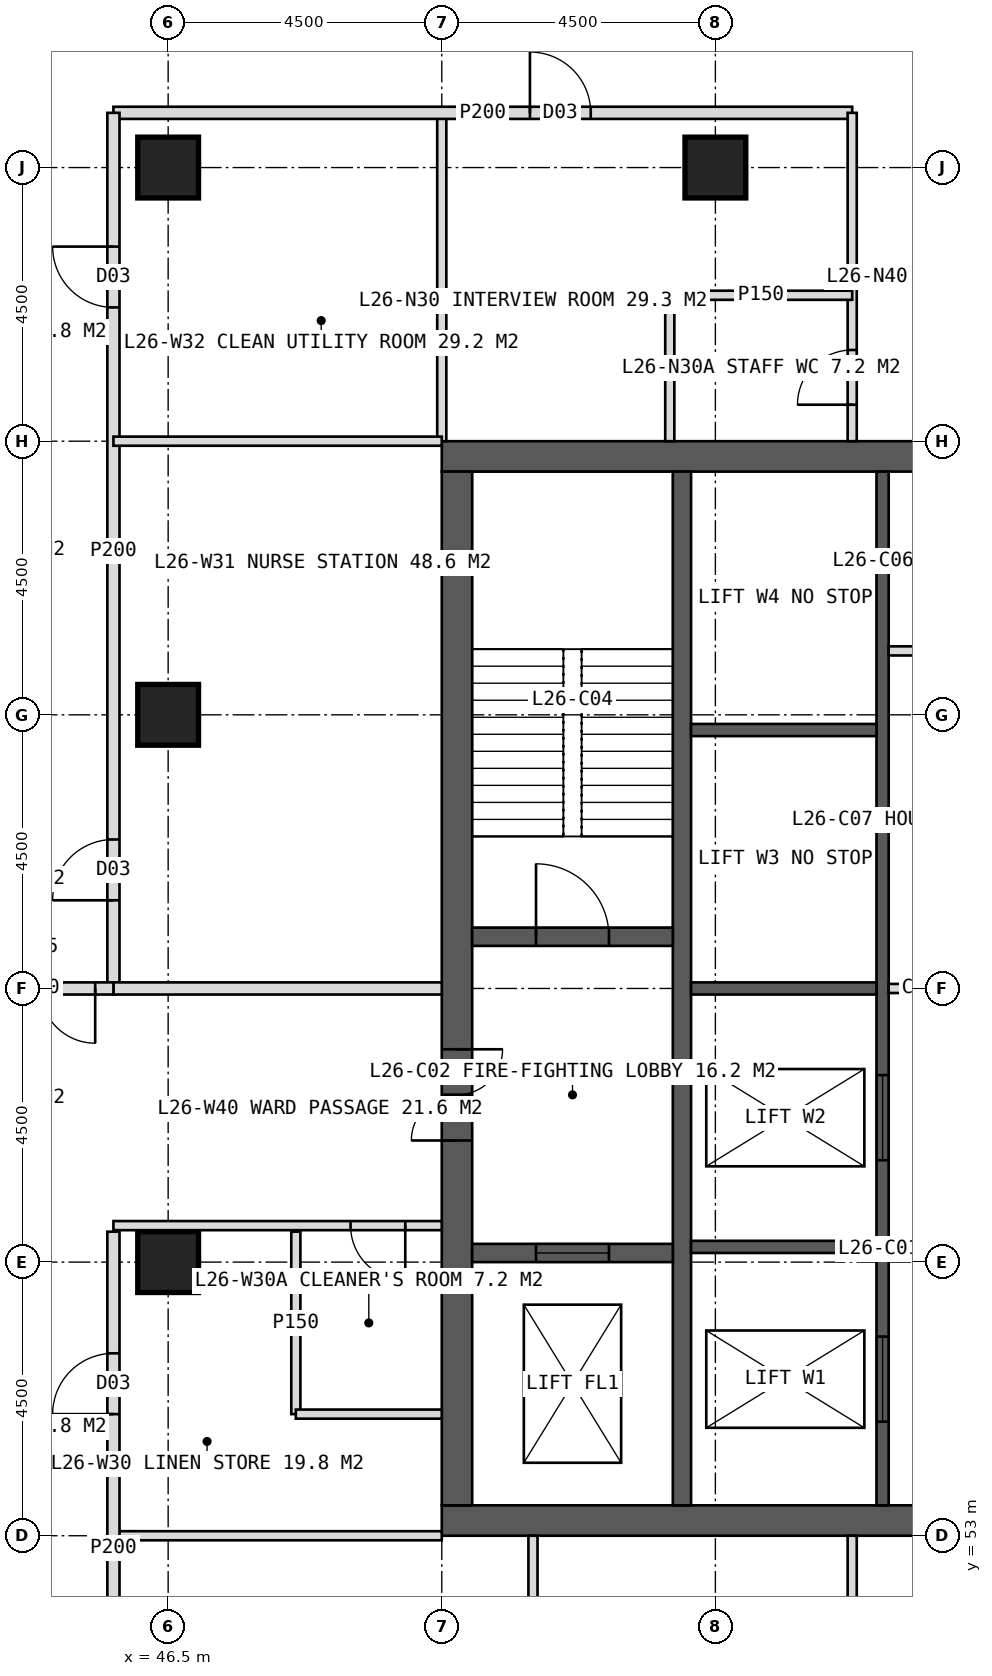
"""IFC4 building model, lengths in metres.
Left out: names, types, materials, properties, quantities, classifications, styles, units other than length and angle.
Written with IfcOpenShell. Run it as: python <this file> out.ifc"""

import sys

from ifc_helpers import new_model, si_unit, direction, frame, frame_2d, origin, origin_2d, place, context, subcontext, project, spatial, rectangle, hollow_rectangle, extrude, element, fill, save


model = new_model("IFC4")
c1 = context("Model", 3, precision=1e-05, world=origin(), true_north=direction((0.0, 1.0)))
c2 = subcontext(c1, "Body", "Model", "MODEL_VIEW")
j1 = project(units=[si_unit("LENGTHUNIT", "METRE"), si_unit("PLANEANGLEUNIT", "RADIAN")], contexts=[c1])
p1 = place(None, origin())
s1 = spatial("IfcSite", under=j1, at=p1, CompositionType="ELEMENT")
p2 = place(p1, origin())
s2 = spatial("IfcBuilding", under=s1, at=p2, CompositionType="ELEMENT")
p3 = place(p2, frame((0.0, 0.0, 112.0)))
s3 = spatial("IfcBuildingStorey", under=s2, at=p3, CompositionType="ELEMENT", Elevation=112.0)
p4 = place(p3, frame((51.0, 70.75, 0.0), z_axis=(0.0, 0.0, 1.0), x_axis=(1.0, 0.0, 0.0)))
e1 = element("IfcWall", 1, at=p4, inside=s3, PredefinedType="SHEAR", context=c2, shape_type="SweptSolid", body=[
    extrude(rectangle(XDim=18.0, YDim=0.5, at=frame_2d((9.0, 0.0))), origin(), (0.0, 0.0, 1.0), 4.0),
])
p5 = place(p4, frame((8.1, 0.0, 0.0)))
e2 = element("IfcOpeningElement", 2, at=p5, cuts=e1, PredefinedType="OPENING", context=c2, shape_type="SweptSolid", body=[
    extrude(rectangle(XDim=1.8, YDim=2.2, at=frame_2d((0.9, 1.1))), frame((0.0, 0.26, 0.0), z_axis=(0.0, -1.0, 0.0), x_axis=(1.0, 0.0, 0.0)), (0.0, 0.0, 1.0), 0.52),
])
p6 = place(p3, frame((51.0, 53.25, 0.0), z_axis=(0.0, 0.0, 1.0), x_axis=(1.0, 0.0, 0.0)))
e3 = element("IfcWall", 3, at=p6, inside=s3, PredefinedType="SHEAR", context=c2, shape_type="SweptSolid", body=[
    extrude(rectangle(XDim=18.0, YDim=0.5, at=frame_2d((9.0, 0.0))), origin(), (0.0, 0.0, 1.0), 4.0),
])
p7 = place(p6, frame((8.1, 0.0, 0.0)))
e4 = element("IfcOpeningElement", 4, at=p7, cuts=e3, PredefinedType="OPENING", context=c2, shape_type="SweptSolid", body=[
    extrude(rectangle(XDim=1.8, YDim=2.2, at=frame_2d((0.9, 1.1))), frame((0.0, 0.26, 0.0), z_axis=(0.0, -1.0, 0.0), x_axis=(1.0, 0.0, 0.0)), (0.0, 0.0, 1.0), 0.52),
])
p8 = place(p3, frame((51.25, 53.5, 0.0), z_axis=(0.0, 0.0, 1.0), x_axis=(0.0, 1.0, 0.0)))
e5 = element("IfcWall", 5, at=p8, inside=s3, PredefinedType="SHEAR", context=c2, shape_type="SweptSolid", body=[
    extrude(rectangle(XDim=17.0, YDim=0.5, at=frame_2d((8.5, 0.0))), origin(), (0.0, 0.0, 1.0), 4.0),
])
p9 = place(p8, frame((6.0, 0.0, 0.0)))
e6 = element("IfcOpeningElement", 6, at=p9, cuts=e5, PredefinedType="OPENING", context=c2, shape_type="SweptSolid", body=[
    extrude(rectangle(XDim=1.5, YDim=2.2, at=frame_2d((0.75, 1.1))), frame((0.0, 0.26, 0.0), z_axis=(0.0, -1.0, 0.0), x_axis=(1.0, 0.0, 0.0)), (0.0, 0.0, 1.0), 0.52),
])
p10 = place(p3, frame((54.95, 53.5, 0.0), z_axis=(0.0, 0.0, 1.0), x_axis=(0.0, 1.0, 0.0)))
e7 = element("IfcWall", 7, at=p10, inside=s3, PredefinedType="SHEAR", context=c2, shape_type="SweptSolid", body=[
    extrude(rectangle(XDim=17.0, YDim=0.3, at=frame_2d((8.5, 0.0))), origin(), (0.0, 0.0, 1.0), 4.0),
])
p11 = place(p3, frame((58.25, 53.5, 0.0), z_axis=(0.0, 0.0, 1.0), x_axis=(0.0, 1.0, 0.0)))
e8 = element("IfcWall", 8, at=p11, inside=s3, PredefinedType="SHEAR", context=c2, shape_type="SweptSolid", body=[
    extrude(rectangle(XDim=17.0, YDim=0.2, at=frame_2d((8.5, 0.0))), origin(), (0.0, 0.0, 1.0), 4.0),
])
p12 = place(p11, frame((1.375, 0.0, 0.0)))
e9 = element("IfcOpeningElement", 9, at=p12, cuts=e8, PredefinedType="OPENING", context=c2, shape_type="SweptSolid", body=[
    extrude(rectangle(XDim=1.4, YDim=2.2, at=frame_2d((0.7, 1.1))), frame((0.0, 0.11, 0.0), z_axis=(0.0, -1.0, 0.0), x_axis=(1.0, 0.0, 0.0)), (0.0, 0.0, 1.0), 0.22),
])
p13 = place(p11, frame((5.675, 0.0, 0.0)))
e10 = element("IfcOpeningElement", 10, at=p13, cuts=e8, PredefinedType="OPENING", context=c2, shape_type="SweptSolid", body=[
    extrude(rectangle(XDim=1.4, YDim=2.2, at=frame_2d((0.7, 1.1))), frame((0.0, 0.11, 0.0), z_axis=(0.0, -1.0, 0.0), x_axis=(1.0, 0.0, 0.0)), (0.0, 0.0, 1.0), 0.22),
])
for number, where, z_axis, x_axis in (
    (11, (55.1, 57.75, 0.0), (0.0, 0.0, 1.0), (1.0, 0.0, 0.0)),
    (12, (55.1, 62.0, 0.0), (0.0, 0.0, 1.0), (1.0, 0.0, 0.0)),
    (13, (55.1, 66.25, 0.0), (0.0, 0.0, 1.0), (1.0, 0.0, 0.0)),
):
    element("IfcWall", number, at=place(p3, frame(where, z_axis=z_axis, x_axis=x_axis)), inside=s3, PredefinedType="SHEAR", context=c2, shape_type="SweptSolid", body=[
        extrude(rectangle(XDim=3.05, YDim=0.2, at=frame_2d((1.525, 0.0))), origin(), (0.0, 0.0, 1.0), 4.0),
    ])
p14 = place(p3, frame((51.5, 62.85, 0.0), z_axis=(0.0, 0.0, 1.0), x_axis=(1.0, 0.0, 0.0)))
e14 = element("IfcWall", 14, at=p14, inside=s3, PredefinedType="SHEAR", context=c2, shape_type="SweptSolid", body=[
    extrude(rectangle(XDim=3.3, YDim=0.3, at=frame_2d((1.65, 0.0))), origin(), (0.0, 0.0, 1.0), 4.0),
])
p15 = place(p14, frame((1.05, 0.0, 0.0)))
e15 = element("IfcOpeningElement", 15, at=p15, cuts=e14, PredefinedType="OPENING", context=c2, shape_type="SweptSolid", body=[
    extrude(rectangle(XDim=1.2, YDim=2.1, at=frame_2d((0.6, 1.05))), frame((0.0, 0.16, 0.0), z_axis=(0.0, -1.0, 0.0), x_axis=(1.0, 0.0, 0.0)), (0.0, 0.0, 1.0), 0.32),
])
p16 = place(p3, frame((51.5, 57.65, 0.0), z_axis=(0.0, 0.0, 1.0), x_axis=(1.0, 0.0, 0.0)))
e16 = element("IfcWall", 16, at=p16, inside=s3, PredefinedType="SHEAR", context=c2, shape_type="SweptSolid", body=[
    extrude(rectangle(XDim=3.3, YDim=0.3, at=frame_2d((1.65, 0.0))), origin(), (0.0, 0.0, 1.0), 4.0),
])
p17 = place(p16, frame((1.05, 0.0, 0.0)))
e17 = element("IfcOpeningElement", 17, at=p17, cuts=e16, PredefinedType="OPENING", context=c2, shape_type="SweptSolid", body=[
    extrude(rectangle(XDim=1.2, YDim=2.2, at=frame_2d((0.6, 1.1))), frame((0.0, 0.16, 0.0), z_axis=(0.0, -1.0, 0.0), x_axis=(1.0, 0.0, 0.0)), (0.0, 0.0, 1.0), 0.32),
])
for number, where, z_axis, x_axis in (
    (18, (46.5, 75.5, 0.0), (0.0, 0.0, 1.0), (1.0, 0.0, 0.0)),
    (19, (55.5, 75.5, 0.0), (0.0, 0.0, 1.0), (1.0, 0.0, 0.0)),
    (20, (46.5, 57.5, 0.0), (0.0, 0.0, 1.0), (1.0, 0.0, 0.0)),
    (21, (46.5, 66.5, 0.0), (0.0, 0.0, 1.0), (1.0, 0.0, 0.0)),
):
    element("IfcColumn", number, at=place(p3, frame(where, z_axis=z_axis, x_axis=x_axis)), inside=s3, PredefinedType="COLUMN", context=c2, shape_type="SweptSolid", body=[
        extrude(hollow_rectangle(XDim=1.0, YDim=1.0, WallThickness=0.1, at=origin_2d()), origin(), (0.0, 0.0, 1.0), 4.0),
    ])
p18 = place(p3, frame((51.0, 71.0, 0.0), z_axis=(0.0, 0.0, 1.0), x_axis=(0.0, 1.0, 0.0)))
e22 = element("IfcWall", 22, at=p18, inside=s3, PredefinedType="PARTITIONING", context=c2, shape_type="SweptSolid", body=[
    extrude(rectangle(XDim=5.4, YDim=0.15, at=frame_2d((2.7, 0.0))), origin(), (0.0, 0.0, 1.0), 3.75),
])
p19 = place(p3, frame((45.6, 76.4, 0.0), z_axis=(0.0, 0.0, 1.0), x_axis=(1.0, 0.0, 0.0)))
e23 = element("IfcWall", 23, at=p19, inside=s3, PredefinedType="PARTITIONING", context=c2, shape_type="SweptSolid", body=[
    extrude(rectangle(XDim=12.15, YDim=0.2, at=frame_2d((6.075, 0.0))), origin(), (0.0, 0.0, 1.0), 3.75),
])
p20 = place(p19, frame((6.85, 0.0, 0.0)))
e24 = element("IfcOpeningElement", 24, at=p20, cuts=e23, PredefinedType="OPENING", context=c2, shape_type="SweptSolid", body=[
    extrude(rectangle(XDim=1.0, YDim=2.1, at=frame_2d((0.5, 1.05))), frame((0.0, 0.11, 0.0), z_axis=(0.0, -1.0, 0.0), x_axis=(1.0, 0.0, 0.0)), (0.0, 0.0, 1.0), 0.22),
])
p21 = place(p3, frame((57.75, 71.0, 0.0), z_axis=(0.0, 0.0, 1.0), x_axis=(0.0, 1.0, 0.0)))
e25 = element("IfcWall", 25, at=p21, inside=s3, PredefinedType="PARTITIONING", context=c2, shape_type="SweptSolid", body=[
    extrude(rectangle(XDim=5.4, YDim=0.15, at=frame_2d((2.7, 0.0))), origin(), (0.0, 0.0, 1.0), 3.75),
])
p22 = place(p21, frame((0.6, 0.0, 0.0)))
e26 = element("IfcOpeningElement", 26, at=p22, cuts=e25, PredefinedType="OPENING", context=c2, shape_type="SweptSolid", body=[
    extrude(rectangle(XDim=0.9, YDim=2.1, at=frame_2d((0.45, 1.05))), frame((0.0, 0.085, 0.0), z_axis=(0.0, -1.0, 0.0), x_axis=(1.0, 0.0, 0.0)), (0.0, 0.0, 1.0), 0.17),
])
p23 = place(p3, frame((54.75, 73.4, 0.0), z_axis=(0.0, 0.0, 1.0), x_axis=(1.0, 0.0, 0.0)))
e27 = element("IfcWall", 27, at=p23, inside=s3, PredefinedType="PARTITIONING", context=c2, shape_type="SweptSolid", body=[
    extrude(rectangle(XDim=3.0, YDim=0.15, at=frame_2d((1.5, 0.0))), origin(), (0.0, 0.0, 1.0), 3.75),
])
p24 = place(p3, frame((54.75, 71.0, 0.0), z_axis=(0.0, 0.0, 1.0), x_axis=(0.0, 1.0, 0.0)))
e28 = element("IfcWall", 28, at=p24, inside=s3, PredefinedType="PARTITIONING", context=c2, shape_type="SweptSolid", body=[
    extrude(rectangle(XDim=2.4, YDim=0.15, at=frame_2d((1.2, 0.0))), origin(), (0.0, 0.0, 1.0), 3.75),
])
p25 = place(p3, frame((51.0, 53.0, 0.0), z_axis=(0.0, 0.0, 1.0), x_axis=(-1.0, 0.0, 0.0)))
e29 = element("IfcWall", 29, at=p25, inside=s3, PredefinedType="PARTITIONING", context=c2, shape_type="SweptSolid", body=[
    extrude(rectangle(XDim=5.4, YDim=0.15, at=frame_2d((2.7, 0.0))), origin(), (0.0, 0.0, 1.0), 3.75),
])
p26 = place(p3, frame((45.6, 47.6, 0.0), z_axis=(0.0, 0.0, 1.0), x_axis=(0.0, 1.0, 0.0)))
e30 = element("IfcWall", 30, at=p26, inside=s3, PredefinedType="PARTITIONING", context=c2, shape_type="SweptSolid", body=[
    extrude(rectangle(XDim=10.4, YDim=0.2, at=frame_2d((5.2, 0.0))), origin(), (0.0, 0.0, 1.0), 3.75),
])
p27 = place(p26, frame((7.4, 0.0, 0.0)))
e31 = element("IfcOpeningElement", 31, at=p27, cuts=e30, PredefinedType="OPENING", context=c2, shape_type="SweptSolid", body=[
    extrude(rectangle(XDim=1.0, YDim=2.1, at=frame_2d((0.5, 1.05))), frame((0.0, 0.11, 0.0), z_axis=(0.0, -1.0, 0.0), x_axis=(1.0, 0.0, 0.0)), (0.0, 0.0, 1.0), 0.22),
])
p28 = place(p3, frame((45.6, 62.0, 0.0), z_axis=(0.0, 0.0, 1.0), x_axis=(0.0, 1.0, 0.0)))
e32 = element("IfcWall", 32, at=p28, inside=s3, PredefinedType="PARTITIONING", context=c2, shape_type="SweptSolid", body=[
    extrude(rectangle(XDim=14.4, YDim=0.2, at=frame_2d((7.2, 0.0))), origin(), (0.0, 0.0, 1.0), 3.75),
])
p29 = place(p28, frame((1.45, 0.0, 0.0)))
e33 = element("IfcOpeningElement", 33, at=p29, cuts=e32, PredefinedType="OPENING", context=c2, shape_type="SweptSolid", body=[
    extrude(rectangle(XDim=1.0, YDim=2.1, at=frame_2d((0.5, 1.05))), frame((0.0, 0.11, 0.0), z_axis=(0.0, -1.0, 0.0), x_axis=(1.0, 0.0, 0.0)), (0.0, 0.0, 1.0), 0.22),
])
p30 = place(p28, frame((11.2, 0.0, 0.0)))
e34 = element("IfcOpeningElement", 34, at=p30, cuts=e32, PredefinedType="OPENING", context=c2, shape_type="SweptSolid", body=[
    extrude(rectangle(XDim=1.0, YDim=2.1, at=frame_2d((0.5, 1.05))), frame((0.0, 0.11, 0.0), z_axis=(0.0, -1.0, 0.0), x_axis=(1.0, 0.0, 0.0)), (0.0, 0.0, 1.0), 0.22),
])
p31 = place(p3, frame((51.0, 58.1, 0.0), z_axis=(0.0, 0.0, 1.0), x_axis=(-1.0, 0.0, 0.0)))
e35 = element("IfcWall", 35, at=p31, inside=s3, PredefinedType="PARTITIONING", context=c2, shape_type="SweptSolid", body=[
    extrude(rectangle(XDim=5.4, YDim=0.15, at=frame_2d((2.7, 0.0))), origin(), (0.0, 0.0, 1.0), 3.75),
])
p32 = place(p31, frame((0.6, 0.0, 0.0)))
e36 = element("IfcOpeningElement", 36, at=p32, cuts=e35, PredefinedType="OPENING", context=c2, shape_type="SweptSolid", body=[
    extrude(rectangle(XDim=0.9, YDim=2.1, at=frame_2d((0.45, 1.05))), frame((0.0, 0.085, 0.0), z_axis=(0.0, -1.0, 0.0), x_axis=(1.0, 0.0, 0.0)), (0.0, 0.0, 1.0), 0.17),
])
p33 = place(p3, frame((51.0, 62.0, 0.0), z_axis=(0.0, 0.0, 1.0), x_axis=(-1.0, 0.0, 0.0)))
e37 = element("IfcWall", 37, at=p33, inside=s3, PredefinedType="SOLIDWALL", context=c2, shape_type="SweptSolid", body=[
    extrude(rectangle(XDim=5.4, YDim=0.2, at=frame_2d((2.7, 0.0))), origin(), (0.0, 0.0, 1.0), 2.95),
])
p34 = place(p3, frame((51.0, 71.0, 0.0), z_axis=(0.0, 0.0, 1.0), x_axis=(-1.0, 0.0, 0.0)))
e38 = element("IfcWall", 38, at=p34, inside=s3, PredefinedType="PARTITIONING", context=c2, shape_type="SweptSolid", body=[
    extrude(rectangle(XDim=5.4, YDim=0.15, at=frame_2d((2.7, 0.0))), origin(), (0.0, 0.0, 1.0), 3.75),
])
p35 = place(p3, frame((48.6, 55.0, 0.0), z_axis=(0.0, 0.0, 1.0), x_axis=(0.0, 1.0, 0.0)))
e39 = element("IfcWall", 39, at=p35, inside=s3, PredefinedType="PARTITIONING", context=c2, shape_type="SweptSolid", body=[
    extrude(rectangle(XDim=3.0, YDim=0.15, at=frame_2d((1.5, 0.0))), origin(), (0.0, 0.0, 1.0), 3.75),
])
p36 = place(p3, frame((51.0, 55.0, 0.0), z_axis=(0.0, 0.0, 1.0), x_axis=(-1.0, 0.0, 0.0)))
e40 = element("IfcWall", 40, at=p36, inside=s3, PredefinedType="PARTITIONING", context=c2, shape_type="SweptSolid", body=[
    extrude(rectangle(XDim=2.4, YDim=0.15, at=frame_2d((1.2, 0.0))), origin(), (0.0, 0.0, 1.0), 3.75),
])
for number, where, z_axis, x_axis in (
    (41, (57.75, 53.0, 0.0), (0.0, 0.0, 1.0), (0.0, -1.0, 0.0)),
    (42, (52.5, 53.0, 0.0), (0.0, 0.0, 1.0), (0.0, -1.0, 0.0)),
):
    element("IfcWall", number, at=place(p3, frame(where, z_axis=z_axis, x_axis=x_axis)), inside=s3, PredefinedType="PARTITIONING", context=c2, shape_type="SweptSolid", body=[
        extrude(rectangle(XDim=5.4, YDim=0.15, at=frame_2d((2.7, 0.0))), origin(), (0.0, 0.0, 1.0), 3.75),
    ])
p37 = place(p3, frame((45.6, 62.0, 0.0), z_axis=(0.0, 0.0, 1.0), x_axis=(-1.0, 0.0, 0.0)))
e43 = element("IfcWall", 43, at=p37, inside=s3, PredefinedType="SOLIDWALL", context=c2, shape_type="SweptSolid", body=[
    extrude(rectangle(XDim=2.7, YDim=0.2, at=frame_2d((1.35, 0.0))), origin(), (0.0, 0.0, 1.0), 2.95),
])
p38 = place(p37, frame((0.3, 0.0, 0.0)))
e44 = element("IfcOpeningElement", 44, at=p38, cuts=e43, PredefinedType="OPENING", context=c2, shape_type="SweptSolid", body=[
    extrude(rectangle(XDim=1.8, YDim=2.2, at=frame_2d((0.9, 1.1))), frame((0.0, 0.11, 0.0), z_axis=(0.0, -1.0, 0.0), x_axis=(1.0, 0.0, 0.0)), (0.0, 0.0, 1.0), 0.22),
])
p39 = place(p3, frame((58.35, 62.0, 0.0), z_axis=(0.0, 0.0, 1.0), x_axis=(1.0, 0.0, 0.0)))
e45 = element("IfcWall", 45, at=p39, inside=s3, PredefinedType="PARTITIONING", context=c2, shape_type="SweptSolid", body=[
    extrude(rectangle(XDim=3.3, YDim=0.15, at=frame_2d((1.65, 0.0))), origin(), (0.0, 0.0, 1.0), 3.75),
])
p40 = place(p39, frame((1.15, 0.0, 0.0)))
e46 = element("IfcOpeningElement", 46, at=p40, cuts=e45, PredefinedType="OPENING", context=c2, shape_type="SweptSolid", body=[
    extrude(rectangle(XDim=1.0, YDim=2.1, at=frame_2d((0.5, 1.05))), frame((0.0, 0.085, 0.0), z_axis=(0.0, -1.0, 0.0), x_axis=(1.0, 0.0, 0.0)), (0.0, 0.0, 1.0), 0.17),
])
p41 = place(p3, frame((58.35, 67.551, 0.0), z_axis=(0.0, 0.0, 1.0), x_axis=(1.0, 0.0, 0.0)))
e47 = element("IfcWall", 47, at=p41, inside=s3, PredefinedType="PARTITIONING", context=c2, shape_type="SweptSolid", body=[
    extrude(rectangle(XDim=3.3, YDim=0.15, at=frame_2d((1.65, 0.0))), origin(), (0.0, 0.0, 1.0), 3.75),
])
p42 = place(p22, origin())
e48 = element("IfcDoor", 48, at=p42, inside=s3, OperationType="SINGLE_SWING_LEFT", PredefinedType="DOOR", context=c2, shape_type="SweptSolid", body=[
    extrude(rectangle(XDim=0.9, YDim=2.1, at=frame_2d((0.45, 1.05))), frame((0.0, 0.025, 0.0), z_axis=(0.0, -1.0, 0.0), x_axis=(1.0, 0.0, 0.0)), (0.0, 0.0, 1.0), 0.05),
])
fill(e26, e48)
p43 = place(p20, origin())
e49 = element("IfcDoor", 49, at=p43, inside=s3, OperationType="SINGLE_SWING_LEFT", PredefinedType="DOOR", context=c2, shape_type="SweptSolid", body=[
    extrude(rectangle(XDim=1.0, YDim=2.1, at=frame_2d((0.5, 1.05))), frame((0.0, 0.025, 0.0), z_axis=(0.0, -1.0, 0.0), x_axis=(1.0, 0.0, 0.0)), (0.0, 0.0, 1.0), 0.05),
])
fill(e24, e49)
p44 = place(p32, origin())
e50 = element("IfcDoor", 50, at=p44, inside=s3, OperationType="SINGLE_SWING_LEFT", PredefinedType="DOOR", context=c2, shape_type="SweptSolid", body=[
    extrude(rectangle(XDim=0.9, YDim=2.1, at=frame_2d((0.45, 1.05))), frame((0.0, 0.025, 0.0), z_axis=(0.0, -1.0, 0.0), x_axis=(1.0, 0.0, 0.0)), (0.0, 0.0, 1.0), 0.05),
])
fill(e36, e50)
p45 = place(p27, origin())
e51 = element("IfcDoor", 51, at=p45, inside=s3, OperationType="SINGLE_SWING_LEFT", PredefinedType="DOOR", context=c2, shape_type="SweptSolid", body=[
    extrude(rectangle(XDim=1.0, YDim=2.1, at=frame_2d((0.5, 1.05))), frame((0.0, 0.025, 0.0), z_axis=(0.0, -1.0, 0.0), x_axis=(1.0, 0.0, 0.0)), (0.0, 0.0, 1.0), 0.05),
])
fill(e31, e51)
p46 = place(p29, origin())
e52 = element("IfcDoor", 52, at=p46, inside=s3, OperationType="SINGLE_SWING_LEFT", PredefinedType="DOOR", context=c2, shape_type="SweptSolid", body=[
    extrude(rectangle(XDim=1.0, YDim=2.1, at=frame_2d((0.5, 1.05))), frame((0.0, 0.025, 0.0), z_axis=(0.0, -1.0, 0.0), x_axis=(1.0, 0.0, 0.0)), (0.0, 0.0, 1.0), 0.05),
])
fill(e33, e52)
p47 = place(p30, origin())
e53 = element("IfcDoor", 53, at=p47, inside=s3, OperationType="SINGLE_SWING_RIGHT", PredefinedType="DOOR", context=c2, shape_type="SweptSolid", body=[
    extrude(rectangle(XDim=1.0, YDim=2.1, at=frame_2d((0.5, 1.05))), frame((0.0, 0.025, 0.0), z_axis=(0.0, -1.0, 0.0), x_axis=(1.0, 0.0, 0.0)), (0.0, 0.0, 1.0), 0.05),
])
fill(e34, e53)
p48 = place(p38, origin())
e54 = element("IfcDoor", 54, at=p48, inside=s3, OperationType="DOUBLE_DOOR_DOUBLE_SWING", PredefinedType="DOOR", context=c2, shape_type="SweptSolid", body=[
    extrude(rectangle(XDim=1.8, YDim=2.2, at=frame_2d((0.9, 1.1))), frame((0.0, 0.025, 0.0), z_axis=(0.0, -1.0, 0.0), x_axis=(1.0, 0.0, 0.0)), (0.0, 0.0, 1.0), 0.05),
])
fill(e44, e54)
p49 = place(p9, origin())
e55 = element("IfcDoor", 55, at=p49, inside=s3, OperationType="DOUBLE_DOOR_SINGLE_SWING", PredefinedType="DOOR", context=c2, shape_type="SweptSolid", body=[
    extrude(rectangle(XDim=1.5, YDim=2.2, at=frame_2d((0.75, 1.1))), frame((0.0, 0.025, 0.0), z_axis=(0.0, -1.0, 0.0), x_axis=(1.0, 0.0, 0.0)), (0.0, 0.0, 1.0), 0.05),
])
fill(e6, e55)
p50 = place(p15, origin())
e56 = element("IfcDoor", 56, at=p50, inside=s3, OperationType="SINGLE_SWING_LEFT", PredefinedType="DOOR", context=c2, shape_type="SweptSolid", body=[
    extrude(rectangle(XDim=1.2, YDim=2.1, at=frame_2d((0.6, 1.05))), frame((0.0, 0.025, 0.0), z_axis=(0.0, -1.0, 0.0), x_axis=(1.0, 0.0, 0.0)), (0.0, 0.0, 1.0), 0.05),
])
fill(e15, e56)
p51 = place(p17, origin())
e57 = element("IfcDoor", 57, at=p51, inside=s3, OperationType="SLIDING_TO_LEFT", PredefinedType="DOOR", context=c2, shape_type="SweptSolid", body=[
    extrude(rectangle(XDim=1.2, YDim=2.2, at=frame_2d((0.6, 1.1))), frame((0.0, 0.025, 0.0), z_axis=(0.0, -1.0, 0.0), x_axis=(1.0, 0.0, 0.0)), (0.0, 0.0, 1.0), 0.05),
])
fill(e17, e57)
p52 = place(p12, origin())
e58 = element("IfcDoor", 58, at=p52, inside=s3, OperationType="SLIDING_TO_LEFT", PredefinedType="DOOR", context=c2, shape_type="SweptSolid", body=[
    extrude(rectangle(XDim=1.4, YDim=2.2, at=frame_2d((0.7, 1.1))), frame((0.0, 0.025, 0.0), z_axis=(0.0, -1.0, 0.0), x_axis=(1.0, 0.0, 0.0)), (0.0, 0.0, 1.0), 0.05),
])
fill(e9, e58)
p53 = place(p13, origin())
e59 = element("IfcDoor", 59, at=p53, inside=s3, OperationType="SLIDING_TO_LEFT", PredefinedType="DOOR", context=c2, shape_type="SweptSolid", body=[
    extrude(rectangle(XDim=1.4, YDim=2.2, at=frame_2d((0.7, 1.1))), frame((0.0, 0.025, 0.0), z_axis=(0.0, -1.0, 0.0), x_axis=(1.0, 0.0, 0.0)), (0.0, 0.0, 1.0), 0.05),
])
fill(e10, e59)
save(model, sys.argv[1])
